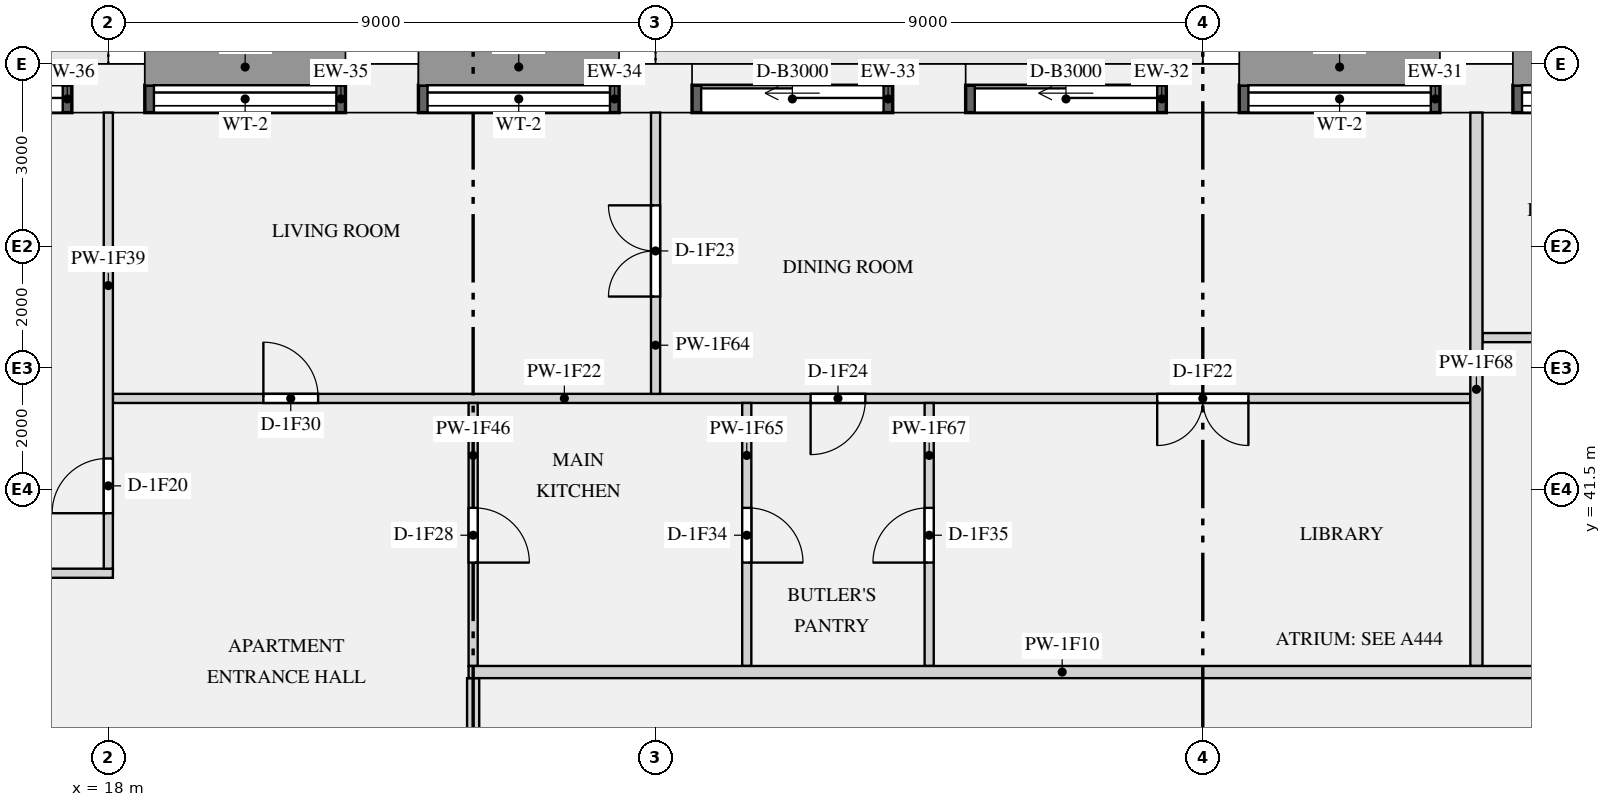
"""IFC4 building model, lengths in metres.
Left out: names, types, materials, properties, quantities, classifications, styles, units other than length and angle.
Written with IfcOpenShell. Run it as: python <this file> out.ifc"""

import sys

from ifc_helpers import new_model, si_unit, direction, frame, frame_2d, origin, origin_2d, place, context, subcontext, project, spatial, rectangle, extrude, element, fill, save


model = new_model("IFC4")
c1 = context("Model", 3, precision=1e-05, world=origin(), true_north=direction((0.0, 1.0)))
c2 = subcontext(c1, "Body", "Model", "MODEL_VIEW")
j1 = project(units=[si_unit("LENGTHUNIT", "METRE"), si_unit("PLANEANGLEUNIT", "RADIAN")], contexts=[c1])
p1 = place(None, origin())
s1 = spatial("IfcSite", under=j1, at=p1, CompositionType="ELEMENT")
p2 = place(p1, origin())
s2 = spatial("IfcBuilding", under=s1, at=p2, CompositionType="ELEMENT")
p3 = place(p2, frame((0.0, 0.0, 60.45)))
s3 = spatial("IfcBuildingStorey", under=s2, at=p3, CompositionType="ELEMENT", Elevation=60.45)
for number, where, z_axis, x_axis in (
    (1, (40.5, 48.1, 0.0), (0.0, 0.0, 1.0), (-1.0, 0.0, 0.0)),
    (2, (36.0, 48.1, 0.0), (0.0, 0.0, 1.0), (-1.0, 0.0, 0.0)),
    (3, (31.5, 48.1, 0.0), (0.0, 0.0, 1.0), (-1.0, 0.0, 0.0)),
    (4, (27.0, 48.1, 0.0), (0.0, 0.0, 1.0), (-1.0, 0.0, 0.0)),
    (5, (22.5, 48.1, 0.0), (0.0, 0.0, 1.0), (-1.0, 0.0, 0.0)),
    (6, (18.0, 48.1, 0.0), (0.0, 0.0, 1.0), (-1.0, 0.0, 0.0)),
):
    element("IfcColumn", number, at=place(p3, frame(where, z_axis=z_axis, x_axis=x_axis)), inside=s3, PredefinedType="USERDEFINED", context=c2, shape_type="SweptSolid", body=[
        extrude(rectangle(XDim=1.2, YDim=0.8, at=origin_2d()), origin(), (0.0, 0.0, 1.0), 3.15),
    ])
p4 = place(p3, frame((44.4, 47.925, 0.9), z_axis=(0.0, 0.0, 1.0), x_axis=(-1.0, 0.0, 0.0)))
e7 = element("IfcWall", 7, at=p4, inside=s3, PredefinedType="SOLIDWALL", context=c2, shape_type="SweptSolid", body=[
    extrude(rectangle(XDim=3.3, YDim=0.45, at=frame_2d((1.65, 0.0))), origin(), (0.0, 0.0, 1.0), 1.93),
])
p5 = place(p4, frame((0.15, 0.0, 0.15)))
e8 = element("IfcOpeningElement", 8, at=p5, cuts=e7, PredefinedType="OPENING", context=c2, shape_type="SweptSolid", body=[
    extrude(rectangle(XDim=3.0, YDim=1.5, at=frame_2d((1.5, 0.75))), frame((0.0, 0.235, 0.0), z_axis=(0.0, -1.0, 0.0), x_axis=(1.0, 0.0, 0.0)), (0.0, 0.0, 1.0), 0.47),
])
p6 = place(p3, frame((39.9, 47.925, 0.9), z_axis=(0.0, 0.0, 1.0), x_axis=(-1.0, 0.0, 0.0)))
e9 = element("IfcWall", 9, at=p6, inside=s3, PredefinedType="SOLIDWALL", context=c2, shape_type="SweptSolid", body=[
    extrude(rectangle(XDim=3.3, YDim=0.45, at=frame_2d((1.65, 0.0))), origin(), (0.0, 0.0, 1.0), 1.93),
])
p7 = place(p6, frame((0.15, 0.0, 0.15)))
e10 = element("IfcOpeningElement", 10, at=p7, cuts=e9, PredefinedType="OPENING", context=c2, shape_type="SweptSolid", body=[
    extrude(rectangle(XDim=3.0, YDim=1.5, at=frame_2d((1.5, 0.75))), frame((0.0, 0.235, 0.0), z_axis=(0.0, -1.0, 0.0), x_axis=(1.0, 0.0, 0.0)), (0.0, 0.0, 1.0), 0.47),
])
p8 = place(p3, frame((35.4, 47.925, 0.0), z_axis=(0.0, 0.0, 1.0), x_axis=(-1.0, 0.0, 0.0)))
e11 = element("IfcWall", 11, at=p8, inside=s3, PredefinedType="SOLIDWALL", context=c2, shape_type="SweptSolid", body=[
    extrude(rectangle(XDim=3.3, YDim=0.45, at=frame_2d((1.65, 0.0))), origin(), (0.0, 0.0, 1.0), 2.83),
])
p9 = place(p8, frame((0.15, 0.0, 0.0)))
e12 = element("IfcOpeningElement", 12, at=p9, cuts=e11, PredefinedType="OPENING", context=c2, shape_type="SweptSolid", body=[
    extrude(rectangle(XDim=3.0, YDim=2.3, at=frame_2d((1.5, 1.15))), frame((0.0, 0.235, 0.0), z_axis=(0.0, -1.0, 0.0), x_axis=(1.0, 0.0, 0.0)), (0.0, 0.0, 1.0), 0.47),
])
p10 = place(p3, frame((30.9, 47.925, 0.0), z_axis=(0.0, 0.0, 1.0), x_axis=(-1.0, 0.0, 0.0)))
e13 = element("IfcWall", 13, at=p10, inside=s3, PredefinedType="SOLIDWALL", context=c2, shape_type="SweptSolid", body=[
    extrude(rectangle(XDim=3.3, YDim=0.45, at=frame_2d((1.65, 0.0))), origin(), (0.0, 0.0, 1.0), 2.83),
])
p11 = place(p10, frame((0.15, 0.0, 0.0)))
e14 = element("IfcOpeningElement", 14, at=p11, cuts=e13, PredefinedType="OPENING", context=c2, shape_type="SweptSolid", body=[
    extrude(rectangle(XDim=3.0, YDim=2.3, at=frame_2d((1.5, 1.15))), frame((0.0, 0.235, 0.0), z_axis=(0.0, -1.0, 0.0), x_axis=(1.0, 0.0, 0.0)), (0.0, 0.0, 1.0), 0.47),
])
p12 = place(p3, frame((26.4, 47.925, 0.9), z_axis=(0.0, 0.0, 1.0), x_axis=(-1.0, 0.0, 0.0)))
e15 = element("IfcWall", 15, at=p12, inside=s3, PredefinedType="SOLIDWALL", context=c2, shape_type="SweptSolid", body=[
    extrude(rectangle(XDim=3.3, YDim=0.45, at=frame_2d((1.65, 0.0))), origin(), (0.0, 0.0, 1.0), 1.93),
])
p13 = place(p12, frame((0.15, 0.0, 0.15)))
e16 = element("IfcOpeningElement", 16, at=p13, cuts=e15, PredefinedType="OPENING", context=c2, shape_type="SweptSolid", body=[
    extrude(rectangle(XDim=3.0, YDim=1.5, at=frame_2d((1.5, 0.75))), frame((0.0, 0.235, 0.0), z_axis=(0.0, -1.0, 0.0), x_axis=(1.0, 0.0, 0.0)), (0.0, 0.0, 1.0), 0.47),
])
p14 = place(p3, frame((21.9, 47.925, 0.9), z_axis=(0.0, 0.0, 1.0), x_axis=(-1.0, 0.0, 0.0)))
e17 = element("IfcWall", 17, at=p14, inside=s3, PredefinedType="SOLIDWALL", context=c2, shape_type="SweptSolid", body=[
    extrude(rectangle(XDim=3.3, YDim=0.45, at=frame_2d((1.65, 0.0))), origin(), (0.0, 0.0, 1.0), 1.93),
])
p15 = place(p14, frame((0.15, 0.0, 0.15)))
e18 = element("IfcOpeningElement", 18, at=p15, cuts=e17, PredefinedType="OPENING", context=c2, shape_type="SweptSolid", body=[
    extrude(rectangle(XDim=3.0, YDim=1.5, at=frame_2d((1.5, 0.75))), frame((0.0, 0.235, 0.0), z_axis=(0.0, -1.0, 0.0), x_axis=(1.0, 0.0, 0.0)), (0.0, 0.0, 1.0), 0.47),
])
p16 = place(p3, frame((17.4, 47.925, 0.0), z_axis=(0.0, 0.0, 1.0), x_axis=(-1.0, 0.0, 0.0)))
e19 = element("IfcWall", 19, at=p16, inside=s3, PredefinedType="SOLIDWALL", context=c2, shape_type="SweptSolid", body=[
    extrude(rectangle(XDim=3.3, YDim=0.45, at=frame_2d((1.65, 0.0))), origin(), (0.0, 0.0, 1.0), 2.83),
])
p17 = place(p16, frame((0.15, 0.0, 0.0)))
e20 = element("IfcOpeningElement", 20, at=p17, cuts=e19, PredefinedType="OPENING", context=c2, shape_type="SweptSolid", body=[
    extrude(rectangle(XDim=3.0, YDim=2.3, at=frame_2d((1.5, 1.15))), frame((0.0, 0.235, 0.0), z_axis=(0.0, -1.0, 0.0), x_axis=(1.0, 0.0, 0.0)), (0.0, 0.0, 1.0), 0.47),
])
p18 = place(p3, frame((23.925, 38.5, 0.0), z_axis=(0.0, 0.0, 1.0), x_axis=(1.0, 0.0, 0.0)))
e21 = element("IfcWall", 21, at=p18, inside=s3, PredefinedType="PARTITIONING", context=c2, shape_type="SweptSolid", body=[
    extrude(rectangle(XDim=24.175, YDim=0.2, at=frame_2d((12.087, 0.0))), origin(), (0.0, 0.0, 1.0), 2.83),
])
p19 = place(p18, frame((19.525, 0.0, 0.0)))
e22 = element("IfcOpeningElement", 22, at=p19, cuts=e21, PredefinedType="OPENING", context=c2, shape_type="SweptSolid", body=[
    extrude(rectangle(XDim=1.1, YDim=2.1, at=frame_2d((0.55, 1.05))), frame((0.0, 0.11, 0.0), z_axis=(0.0, -1.0, 0.0), x_axis=(1.0, 0.0, 0.0)), (0.0, 0.0, 1.0), 0.22),
])
p20 = place(p3, frame((18.075, 43.0, 0.0), z_axis=(0.0, 0.0, 1.0), x_axis=(1.0, 0.0, 0.0)))
e23 = element("IfcWall", 23, at=p20, inside=s3, PredefinedType="PARTITIONING", context=c2, shape_type="SweptSolid", body=[
    extrude(rectangle(XDim=22.325, YDim=0.15, at=frame_2d((11.163, 0.0))), origin(), (0.0, 0.0, 1.0), 2.83),
])
p21 = place(p20, frame((17.175, 0.0, 0.0)))
e24 = element("IfcOpeningElement", 24, at=p21, cuts=e23, PredefinedType="OPENING", context=c2, shape_type="SweptSolid", body=[
    extrude(rectangle(XDim=1.5, YDim=2.1, at=frame_2d((0.75, 1.05))), frame((0.0, 0.085, 0.0), z_axis=(0.0, -1.0, 0.0), x_axis=(1.0, 0.0, 0.0)), (0.0, 0.0, 1.0), 0.17),
])
p22 = place(p20, frame((11.475, 0.0, 0.0)))
e25 = element("IfcOpeningElement", 25, at=p22, cuts=e23, PredefinedType="OPENING", context=c2, shape_type="SweptSolid", body=[
    extrude(rectangle(XDim=0.9, YDim=2.1, at=frame_2d((0.45, 1.05))), frame((0.0, 0.085, 0.0), z_axis=(0.0, -1.0, 0.0), x_axis=(1.0, 0.0, 0.0)), (0.0, 0.0, 1.0), 0.17),
])
p23 = place(p20, frame((2.475, 0.0, 0.0)))
e26 = element("IfcOpeningElement", 26, at=p23, cuts=e23, PredefinedType="OPENING", context=c2, shape_type="SweptSolid", body=[
    extrude(rectangle(XDim=0.9, YDim=2.1, at=frame_2d((0.45, 1.05))), frame((0.0, 0.085, 0.0), z_axis=(0.0, -1.0, 0.0), x_axis=(1.0, 0.0, 0.0)), (0.0, 0.0, 1.0), 0.17),
])
p24 = place(p3, frame((13.425, 40.125, 0.0), z_axis=(0.0, 0.0, 1.0), x_axis=(1.0, 0.0, 0.0)))
e27 = element("IfcWall", 27, at=p24, inside=s3, PredefinedType="PARTITIONING", context=c2, shape_type="SweptSolid", body=[
    extrude(rectangle(XDim=4.65, YDim=0.15, at=frame_2d((2.325, 0.0))), origin(), (0.0, 0.0, 1.0), 2.83),
])
p25 = place(p3, frame((40.6, 44.0, 0.0), z_axis=(0.0, 0.0, 1.0), x_axis=(1.0, 0.0, 0.0)))
e28 = element("IfcWall", 28, at=p25, inside=s3, PredefinedType="PARTITIONING", context=c2, shape_type="SweptSolid", body=[
    extrude(rectangle(XDim=13.325, YDim=0.15, at=frame_2d((6.663, 0.0))), origin(), (0.0, 0.0, 1.0), 2.83),
])
p26 = place(p25, frame((10.7, 0.0, 0.0)))
e29 = element("IfcOpeningElement", 29, at=p26, cuts=e28, PredefinedType="OPENING", context=c2, shape_type="SweptSolid", body=[
    extrude(rectangle(XDim=0.9, YDim=2.1, at=frame_2d((0.45, 1.05))), frame((0.0, 0.085, 0.0), z_axis=(0.0, -1.0, 0.0), x_axis=(1.0, 0.0, 0.0)), (0.0, 0.0, 1.0), 0.17),
])
p27 = place(p25, frame((3.95, 0.0, 0.0)))
e30 = element("IfcOpeningElement", 30, at=p27, cuts=e28, PredefinedType="OPENING", context=c2, shape_type="SweptSolid", body=[
    extrude(rectangle(XDim=0.9, YDim=2.1, at=frame_2d((0.45, 1.05))), frame((0.0, 0.085, 0.0), z_axis=(0.0, -1.0, 0.0), x_axis=(1.0, 0.0, 0.0)), (0.0, 0.0, 1.0), 0.17),
])
p28 = place(p3, frame((18.0, 40.2, 0.0), z_axis=(0.0, 0.0, 1.0), x_axis=(0.0, 1.0, 0.0)))
e31 = element("IfcWall", 31, at=p28, inside=s3, PredefinedType="PARTITIONING", context=c2, shape_type="SweptSolid", body=[
    extrude(rectangle(XDim=7.5, YDim=0.15, at=frame_2d((3.75, 0.0))), origin(), (0.0, 0.0, 1.0), 2.83),
])
p29 = place(p28, frame((0.912, 0.0, 0.0)))
e32 = element("IfcOpeningElement", 32, at=p29, cuts=e31, PredefinedType="OPENING", context=c2, shape_type="SweptSolid", body=[
    extrude(rectangle(XDim=0.9, YDim=2.1, at=frame_2d((0.45, 1.05))), frame((0.0, 0.085, 0.0), z_axis=(0.0, -1.0, 0.0), x_axis=(1.0, 0.0, 0.0)), (0.0, 0.0, 1.0), 0.17),
])
p30 = place(p3, frame((24.0, 38.6, 0.0), z_axis=(0.0, 0.0, 1.0), x_axis=(0.0, 1.0, 0.0)))
e33 = element("IfcWall", 33, at=p30, inside=s3, PredefinedType="PARTITIONING", context=c2, shape_type="SweptSolid", body=[
    extrude(rectangle(XDim=4.325, YDim=0.15, at=frame_2d((2.163, 0.0))), origin(), (0.0, 0.0, 1.0), 2.83),
])
p31 = place(p30, frame((1.7, 0.0, 0.0)))
e34 = element("IfcOpeningElement", 34, at=p31, cuts=e33, PredefinedType="OPENING", context=c2, shape_type="SweptSolid", body=[
    extrude(rectangle(XDim=0.9, YDim=2.1, at=frame_2d((0.45, 1.05))), frame((0.0, 0.085, 0.0), z_axis=(0.0, -1.0, 0.0), x_axis=(1.0, 0.0, 0.0)), (0.0, 0.0, 1.0), 0.17),
])
p32 = place(p3, frame((24.0, 27.1, 0.0), z_axis=(0.0, 0.0, 1.0), x_axis=(0.0, 1.0, 0.0)))
e35 = element("IfcWall", 35, at=p32, inside=s3, PredefinedType="PARTITIONING", context=c2, shape_type="SweptSolid", body=[
    extrude(rectangle(XDim=11.3, YDim=0.2, at=frame_2d((5.65, 0.0))), origin(), (0.0, 0.0, 1.0), 2.83),
])
p33 = place(p32, frame((5.35, 0.0, 0.0)))
e36 = element("IfcOpeningElement", 36, at=p33, cuts=e35, PredefinedType="OPENING", context=c2, shape_type="SweptSolid", body=[
    extrude(rectangle(XDim=1.1, YDim=2.1, at=frame_2d((0.55, 1.05))), frame((0.0, 0.11, 0.0), z_axis=(0.0, -1.0, 0.0), x_axis=(1.0, 0.0, 0.0)), (0.0, 0.0, 1.0), 0.22),
])
p34 = place(p3, frame((27.0, 43.075, 0.0), z_axis=(0.0, 0.0, 1.0), x_axis=(0.0, 1.0, 0.0)))
e37 = element("IfcWall", 37, at=p34, inside=s3, PredefinedType="PARTITIONING", context=c2, shape_type="SweptSolid", body=[
    extrude(rectangle(XDim=4.625, YDim=0.15, at=frame_2d((2.312, 0.0))), origin(), (0.0, 0.0, 1.0), 2.83),
])
p35 = place(p34, frame((1.6, 0.0, 0.0)))
e38 = element("IfcOpeningElement", 38, at=p35, cuts=e37, PredefinedType="OPENING", context=c2, shape_type="SweptSolid", body=[
    extrude(rectangle(XDim=1.5, YDim=2.1, at=frame_2d((0.75, 1.05))), frame((0.0, 0.085, 0.0), z_axis=(0.0, -1.0, 0.0), x_axis=(1.0, 0.0, 0.0)), (0.0, 0.0, 1.0), 0.17),
])
p36 = place(p3, frame((28.5, 38.6, 0.0), z_axis=(0.0, 0.0, 1.0), x_axis=(0.0, 1.0, 0.0)))
e39 = element("IfcWall", 39, at=p36, inside=s3, PredefinedType="PARTITIONING", context=c2, shape_type="SweptSolid", body=[
    extrude(rectangle(XDim=4.325, YDim=0.15, at=frame_2d((2.163, 0.0))), origin(), (0.0, 0.0, 1.0), 2.83),
])
p37 = place(p36, frame((1.7, 0.0, 0.0)))
e40 = element("IfcOpeningElement", 40, at=p37, cuts=e39, PredefinedType="OPENING", context=c2, shape_type="SweptSolid", body=[
    extrude(rectangle(XDim=0.9, YDim=2.1, at=frame_2d((0.45, 1.05))), frame((0.0, 0.085, 0.0), z_axis=(0.0, -1.0, 0.0), x_axis=(1.0, 0.0, 0.0)), (0.0, 0.0, 1.0), 0.17),
])
p38 = place(p3, frame((31.5, 38.6, 0.0), z_axis=(0.0, 0.0, 1.0), x_axis=(0.0, 1.0, 0.0)))
e41 = element("IfcWall", 41, at=p38, inside=s3, PredefinedType="PARTITIONING", context=c2, shape_type="SweptSolid", body=[
    extrude(rectangle(XDim=4.325, YDim=0.15, at=frame_2d((2.163, 0.0))), origin(), (0.0, 0.0, 1.0), 2.83),
])
p39 = place(p38, frame((1.7, 0.0, 0.0)))
e42 = element("IfcOpeningElement", 42, at=p39, cuts=e41, PredefinedType="OPENING", context=c2, shape_type="SweptSolid", body=[
    extrude(rectangle(XDim=0.9, YDim=2.1, at=frame_2d((0.45, 1.05))), frame((0.0, 0.085, 0.0), z_axis=(0.0, -1.0, 0.0), x_axis=(1.0, 0.0, 0.0)), (0.0, 0.0, 1.0), 0.17),
])
p40 = place(p3, frame((40.5, 38.6, 0.0), z_axis=(0.0, 0.0, 1.0), x_axis=(0.0, 1.0, 0.0)))
e43 = element("IfcWall", 43, at=p40, inside=s3, PredefinedType="PARTITIONING", context=c2, shape_type="SweptSolid", body=[
    extrude(rectangle(XDim=9.1, YDim=0.2, at=frame_2d((4.55, 0.0))), origin(), (0.0, 0.0, 1.0), 2.83),
])
p41 = place(p5, origin())
e44 = element("IfcWindow", 44, at=p41, inside=s3, PartitioningType="SINGLE_PANEL", PredefinedType="WINDOW", context=c2, shape_type="SweptSolid", body=[
    extrude(rectangle(XDim=3.0, YDim=1.5, at=frame_2d((1.5, 0.75))), frame((0.0, -0.065, 0.0), z_axis=(0.0, -1.0, 0.0), x_axis=(1.0, 0.0, 0.0)), (0.0, 0.0, 1.0), 0.06),
])
fill(e8, e44)
p42 = place(p7, origin())
e45 = element("IfcWindow", 45, at=p42, inside=s3, PartitioningType="SINGLE_PANEL", PredefinedType="WINDOW", context=c2, shape_type="SweptSolid", body=[
    extrude(rectangle(XDim=3.0, YDim=1.5, at=frame_2d((1.5, 0.75))), frame((0.0, -0.065, 0.0), z_axis=(0.0, -1.0, 0.0), x_axis=(1.0, 0.0, 0.0)), (0.0, 0.0, 1.0), 0.06),
])
fill(e10, e45)
p43 = place(p9, origin())
e46 = element("IfcDoor", 46, at=p43, inside=s3, OperationType="SLIDING_TO_LEFT", PredefinedType="DOOR", context=c2, shape_type="SweptSolid", body=[
    extrude(rectangle(XDim=3.0, YDim=2.3, at=frame_2d((1.5, 1.15))), frame((0.0, -0.07, 0.0), z_axis=(0.0, -1.0, 0.0), x_axis=(1.0, 0.0, 0.0)), (0.0, 0.0, 1.0), 0.05),
])
fill(e12, e46)
p44 = place(p11, origin())
e47 = element("IfcDoor", 47, at=p44, inside=s3, OperationType="SLIDING_TO_LEFT", PredefinedType="DOOR", context=c2, shape_type="SweptSolid", body=[
    extrude(rectangle(XDim=3.0, YDim=2.3, at=frame_2d((1.5, 1.15))), frame((0.0, -0.07, 0.0), z_axis=(0.0, -1.0, 0.0), x_axis=(1.0, 0.0, 0.0)), (0.0, 0.0, 1.0), 0.05),
])
fill(e14, e47)
p45 = place(p13, origin())
e48 = element("IfcWindow", 48, at=p45, inside=s3, PartitioningType="SINGLE_PANEL", PredefinedType="WINDOW", context=c2, shape_type="SweptSolid", body=[
    extrude(rectangle(XDim=3.0, YDim=1.5, at=frame_2d((1.5, 0.75))), frame((0.0, -0.065, 0.0), z_axis=(0.0, -1.0, 0.0), x_axis=(1.0, 0.0, 0.0)), (0.0, 0.0, 1.0), 0.06),
])
fill(e16, e48)
p46 = place(p15, origin())
e49 = element("IfcWindow", 49, at=p46, inside=s3, PartitioningType="SINGLE_PANEL", PredefinedType="WINDOW", context=c2, shape_type="SweptSolid", body=[
    extrude(rectangle(XDim=3.0, YDim=1.5, at=frame_2d((1.5, 0.75))), frame((0.0, -0.065, 0.0), z_axis=(0.0, -1.0, 0.0), x_axis=(1.0, 0.0, 0.0)), (0.0, 0.0, 1.0), 0.06),
])
fill(e18, e49)
p47 = place(p17, origin())
e50 = element("IfcDoor", 50, at=p47, inside=s3, OperationType="SLIDING_TO_LEFT", PredefinedType="DOOR", context=c2, shape_type="SweptSolid", body=[
    extrude(rectangle(XDim=3.0, YDim=2.3, at=frame_2d((1.5, 1.15))), frame((0.0, -0.07, 0.0), z_axis=(0.0, -1.0, 0.0), x_axis=(1.0, 0.0, 0.0)), (0.0, 0.0, 1.0), 0.05),
])
fill(e20, e50)
p48 = place(p29, origin())
e51 = element("IfcDoor", 51, at=p48, inside=s3, OperationType="SINGLE_SWING_LEFT", PredefinedType="DOOR", context=c2, shape_type="SweptSolid", body=[
    extrude(rectangle(XDim=0.9, YDim=2.1, at=frame_2d((0.45, 1.05))), frame((0.0, 0.025, 0.0), z_axis=(0.0, -1.0, 0.0), x_axis=(1.0, 0.0, 0.0)), (0.0, 0.0, 1.0), 0.05),
])
fill(e32, e51)
p49 = place(p21, frame((1.5, 0.0, 0.0), z_axis=(0.0, 0.0, 1.0), x_axis=(-1.0, 0.0, 0.0)))
e52 = element("IfcDoor", 52, at=p49, inside=s3, OperationType="DOUBLE_DOOR_SINGLE_SWING", PredefinedType="DOOR", context=c2, shape_type="SweptSolid", body=[
    extrude(rectangle(XDim=1.5, YDim=2.1, at=frame_2d((0.75, 1.05))), frame((0.0, 0.025, 0.0), z_axis=(0.0, -1.0, 0.0), x_axis=(1.0, 0.0, 0.0)), (0.0, 0.0, 1.0), 0.05),
])
fill(e24, e52)
p50 = place(p35, origin())
e53 = element("IfcDoor", 53, at=p50, inside=s3, OperationType="DOUBLE_DOOR_SINGLE_SWING", PredefinedType="DOOR", context=c2, shape_type="SweptSolid", body=[
    extrude(rectangle(XDim=1.5, YDim=2.1, at=frame_2d((0.75, 1.05))), frame((0.0, 0.025, 0.0), z_axis=(0.0, -1.0, 0.0), x_axis=(1.0, 0.0, 0.0)), (0.0, 0.0, 1.0), 0.05),
])
fill(e38, e53)
p51 = place(p22, frame((0.9, 0.0, 0.0), z_axis=(0.0, 0.0, 1.0), x_axis=(-1.0, 0.0, 0.0)))
e54 = element("IfcDoor", 54, at=p51, inside=s3, OperationType="SINGLE_SWING_RIGHT", PredefinedType="DOOR", context=c2, shape_type="SweptSolid", body=[
    extrude(rectangle(XDim=0.9, YDim=2.1, at=frame_2d((0.45, 1.05))), frame((0.0, 0.025, 0.0), z_axis=(0.0, -1.0, 0.0), x_axis=(1.0, 0.0, 0.0)), (0.0, 0.0, 1.0), 0.05),
])
fill(e25, e54)
p52 = place(p31, frame((0.9, 0.0, 0.0), z_axis=(0.0, 0.0, 1.0), x_axis=(-1.0, 0.0, 0.0)))
e55 = element("IfcDoor", 55, at=p52, inside=s3, OperationType="SINGLE_SWING_RIGHT", PredefinedType="DOOR", context=c2, shape_type="SweptSolid", body=[
    extrude(rectangle(XDim=0.9, YDim=2.1, at=frame_2d((0.45, 1.05))), frame((0.0, 0.025, 0.0), z_axis=(0.0, -1.0, 0.0), x_axis=(1.0, 0.0, 0.0)), (0.0, 0.0, 1.0), 0.05),
])
fill(e34, e55)
p53 = place(p23, origin())
e56 = element("IfcDoor", 56, at=p53, inside=s3, OperationType="SINGLE_SWING_LEFT", PredefinedType="DOOR", context=c2, shape_type="SweptSolid", body=[
    extrude(rectangle(XDim=0.9, YDim=2.1, at=frame_2d((0.45, 1.05))), frame((0.0, 0.025, 0.0), z_axis=(0.0, -1.0, 0.0), x_axis=(1.0, 0.0, 0.0)), (0.0, 0.0, 1.0), 0.05),
])
fill(e26, e56)
p54 = place(p37, frame((0.9, 0.0, 0.0), z_axis=(0.0, 0.0, 1.0), x_axis=(-1.0, 0.0, 0.0)))
e57 = element("IfcDoor", 57, at=p54, inside=s3, OperationType="SINGLE_SWING_RIGHT", PredefinedType="DOOR", context=c2, shape_type="SweptSolid", body=[
    extrude(rectangle(XDim=0.9, YDim=2.1, at=frame_2d((0.45, 1.05))), frame((0.0, 0.025, 0.0), z_axis=(0.0, -1.0, 0.0), x_axis=(1.0, 0.0, 0.0)), (0.0, 0.0, 1.0), 0.05),
])
fill(e40, e57)
p55 = place(p39, origin())
e58 = element("IfcDoor", 58, at=p55, inside=s3, OperationType="SINGLE_SWING_LEFT", PredefinedType="DOOR", context=c2, shape_type="SweptSolid", body=[
    extrude(rectangle(XDim=0.9, YDim=2.1, at=frame_2d((0.45, 1.05))), frame((0.0, 0.025, 0.0), z_axis=(0.0, -1.0, 0.0), x_axis=(1.0, 0.0, 0.0)), (0.0, 0.0, 1.0), 0.05),
])
fill(e42, e58)
save(model, sys.argv[1])
